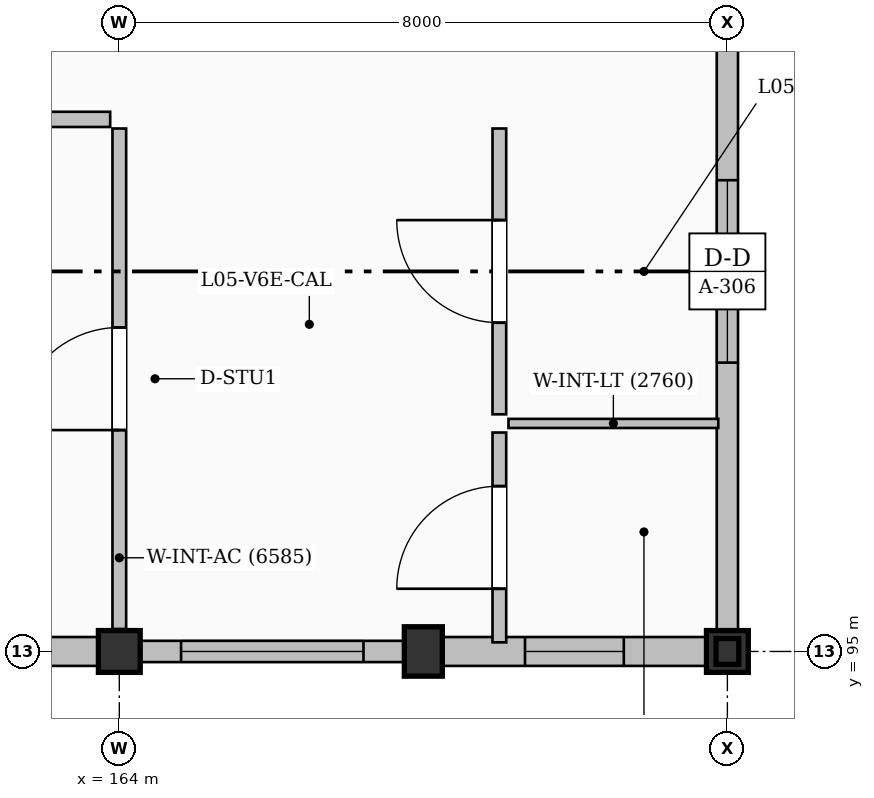
"""IFC4 building model, lengths in metres.
Left out: names, types, materials, properties, quantities, classifications, styles, units other than length and angle.
Written with IfcOpenShell. Run it as: python <this file> out.ifc"""

import sys

from ifc_helpers import new_model, si_unit, direction, frame, frame_2d, origin, origin_2d, place, context, subcontext, project, spatial, rectangle, i_section, extrude, element, fill, save


model = new_model("IFC4")
c1 = context("Model", 3, precision=1e-05, world=origin(), true_north=direction((0.0, 1.0)))
c2 = subcontext(c1, "Body", "Model", "MODEL_VIEW")
j1 = project(units=[si_unit("LENGTHUNIT", "METRE"), si_unit("PLANEANGLEUNIT", "RADIAN")], contexts=[c1])
p1 = place(None, origin())
s1 = spatial("IfcSite", under=j1, at=p1, CompositionType="ELEMENT")
p2 = place(p1, origin())
s2 = spatial("IfcBuilding", under=s1, at=p2, CompositionType="ELEMENT")
p3 = place(p2, frame((0.0, 0.0, 22.8)))
s3 = spatial("IfcBuildingStorey", under=s2, at=p3, CompositionType="ELEMENT", Elevation=22.8)
p4 = place(p3, frame((164.0, 95.0, 0.0), z_axis=(0.0, 0.0, 1.0), x_axis=(1.0, 0.0, 0.0)))
e1 = element("IfcColumn", 1, at=p4, inside=s3, PredefinedType="COLUMN", context=c2, shape_type="SweptSolid", body=[
    extrude(rectangle(XDim=0.55, YDim=0.55, at=origin_2d()), origin(), (0.0, 0.0, 1.0), 4.5),
])
p5 = place(p3, frame((168.0, 95.0, 0.0), z_axis=(0.0, 0.0, 1.0), x_axis=(1.0, 0.0, 0.0)))
e2 = element("IfcColumn", 2, at=p5, inside=s3, PredefinedType="PILASTER", context=c2, shape_type="SweptSolid", body=[
    extrude(rectangle(XDim=0.5, YDim=0.65, at=origin_2d()), origin(), (0.0, 0.0, 1.0), 4.5),
])
p6 = place(p3, frame((172.0, 95.0, 0.0), z_axis=(0.0, 0.0, 1.0), x_axis=(1.0, 0.0, 0.0)))
e3 = element("IfcColumn", 3, at=p6, inside=s3, PredefinedType="COLUMN", context=c2, shape_type="SweptSolid", body=[
    extrude(rectangle(XDim=0.55, YDim=0.55, at=origin_2d()), origin(), (0.0, 0.0, 1.0), 4.5),
])
p7 = place(p3, frame((172.0, 95.0, 4.5), z_axis=(0.0, 0.0, 1.0), x_axis=(1.0, 0.0, 0.0)))
e4 = element("IfcColumn", 4, at=p7, inside=s3, PredefinedType="COLUMN", context=c2, shape_type="SweptSolid", body=[
    extrude(i_section(OverallWidth=0.3, OverallDepth=0.34, WebThickness=0.012, FlangeThickness=0.021, FilletRadius=0.027, at=origin_2d()), origin(), (0.0, 0.0, 1.0), 1.342),
])
p8 = place(p3, frame((172.0, 104.725, 0.0), z_axis=(0.0, 0.0, 1.0), x_axis=(0.0, -1.0, 0.0)))
e5 = element("IfcWall", 5, at=p8, inside=s3, PredefinedType="SOLIDWALL", context=c2, shape_type="SweptSolid", body=[
    extrude(rectangle(XDim=9.45, YDim=0.28, at=frame_2d((4.725, 0.0))), origin(), (0.0, 0.0, 1.0), 3.585),
])
p9 = place(p8, frame((3.525, 0.0, 0.95)))
e6 = element("IfcOpeningElement", 6, at=p9, cuts=e5, PredefinedType="OPENING", context=c2, shape_type="SweptSolid", body=[
    extrude(rectangle(XDim=2.4, YDim=1.2, at=frame_2d((1.2, 0.6))), frame((0.0, 0.15, 0.0), z_axis=(0.0, -1.0, 0.0), x_axis=(1.0, 0.0, 0.0)), (0.0, 0.0, 1.0), 0.3),
])
p10 = place(p3, frame((171.725, 95.0, 0.0), z_axis=(0.0, 0.0, 1.0), x_axis=(-1.0, 0.0, 0.0)))
e7 = element("IfcWall", 7, at=p10, inside=s3, PredefinedType="SOLIDWALL", context=c2, shape_type="SweptSolid", body=[
    extrude(rectangle(XDim=3.475, YDim=0.38, at=frame_2d((1.738, 0.0))), origin(), (0.0, 0.0, 1.0), 4.125),
])
p11 = place(p10, frame((1.087, 0.0, 0.95)))
e8 = element("IfcOpeningElement", 8, at=p11, cuts=e7, PredefinedType="OPENING", context=c2, shape_type="SweptSolid", body=[
    extrude(rectangle(XDim=1.3, YDim=1.4, at=frame_2d((0.65, 0.7))), frame((0.0, 0.2, 0.0), z_axis=(0.0, -1.0, 0.0), x_axis=(1.0, 0.0, 0.0)), (0.0, 0.0, 1.0), 0.4),
])
p12 = place(p3, frame((167.75, 95.0, 0.0), z_axis=(0.0, 0.0, 1.0), x_axis=(-1.0, 0.0, 0.0)))
e9 = element("IfcWall", 9, at=p12, inside=s3, PredefinedType="SOLIDWALL", context=c2, shape_type="SweptSolid", body=[
    extrude(rectangle(XDim=3.475, YDim=0.28, at=frame_2d((1.738, 0.0))), origin(), (0.0, 0.0, 1.0), 4.125),
])
p13 = place(p12, frame((0.538, 0.0, 0.95)))
e10 = element("IfcOpeningElement", 10, at=p13, cuts=e9, PredefinedType="OPENING", context=c2, shape_type="SweptSolid", body=[
    extrude(rectangle(XDim=2.4, YDim=1.2, at=frame_2d((1.2, 0.6))), frame((0.0, 0.15, 0.0), z_axis=(0.0, -1.0, 0.0), x_axis=(1.0, 0.0, 0.0)), (0.0, 0.0, 1.0), 0.3),
])
p14 = place(p3, frame((163.725, 95.0, 0.0), z_axis=(0.0, 0.0, 1.0), x_axis=(-1.0, 0.0, 0.0)))
e11 = element("IfcWall", 11, at=p14, inside=s3, PredefinedType="SOLIDWALL", context=c2, shape_type="SweptSolid", body=[
    extrude(rectangle(XDim=3.525, YDim=0.38, at=frame_2d((1.763, 0.0))), origin(), (0.0, 0.0, 1.0), 4.125),
])
p15 = place(p14, frame((0.913, 0.0, 0.95)))
e12 = element("IfcOpeningElement", 12, at=p15, cuts=e11, PredefinedType="OPENING", context=c2, shape_type="SweptSolid", body=[
    extrude(rectangle(XDim=1.7, YDim=2.0, at=frame_2d((0.85, 1.0))), frame((0.0, 0.2, 0.0), z_axis=(0.0, -1.0, 0.0), x_axis=(1.0, 0.0, 0.0)), (0.0, 0.0, 1.0), 0.4),
])
p16 = place(p3, frame((164.0, 95.295, 0.0), z_axis=(0.0, 0.0, 1.0), x_axis=(0.0, 1.0, 0.0)))
e13 = element("IfcWall", 13, at=p16, inside=s3, PredefinedType="PARTITIONING", context=c2, shape_type="SweptSolid", body=[
    extrude(rectangle(XDim=6.585, YDim=0.18, at=frame_2d((3.292, 0.0))), origin(), (0.0, 0.0, 1.0), 4.25),
])
p17 = place(p16, frame((2.617, 0.0, 0.0)))
e14 = element("IfcOpeningElement", 14, at=p17, cuts=e13, PredefinedType="OPENING", context=c2, shape_type="SweptSolid", body=[
    extrude(rectangle(XDim=1.35, YDim=2.2, at=frame_2d((0.675, 1.1))), frame((0.0, 0.1, 0.0), z_axis=(0.0, -1.0, 0.0), x_axis=(1.0, 0.0, 0.0)), (0.0, 0.0, 1.0), 0.2),
])
p18 = place(p3, frame((154.12, 102.0, 0.0), z_axis=(0.0, 0.0, 1.0), x_axis=(1.0, 0.0, 0.0)))
e15 = element("IfcWall", 15, at=p18, inside=s3, PredefinedType="PARTITIONING", context=c2, shape_type="SweptSolid", body=[
    extrude(rectangle(XDim=9.76, YDim=0.2, at=frame_2d((4.88, 0.0))), origin(), (0.0, 0.0, 1.0), 4.25),
])
p19 = place(p18, frame((4.205, 0.0, 0.0)))
e16 = element("IfcOpeningElement", 16, at=p19, cuts=e15, PredefinedType="OPENING", context=c2, shape_type="SweptSolid", body=[
    extrude(rectangle(XDim=1.35, YDim=2.2, at=frame_2d((0.675, 1.1))), frame((0.0, 0.11, 0.0), z_axis=(0.0, -1.0, 0.0), x_axis=(1.0, 0.0, 0.0)), (0.0, 0.0, 1.0), 0.22),
])
p20 = place(p3, frame((169.0, 95.12, 0.0), z_axis=(0.0, 0.0, 1.0), x_axis=(0.0, 1.0, 0.0)))
e17 = element("IfcWall", 17, at=p20, inside=s3, PredefinedType="PARTITIONING", context=c2, shape_type="SweptSolid", body=[
    extrude(rectangle(XDim=2.76, YDim=0.18, at=frame_2d((1.38, 0.0))), origin(), (0.0, 0.0, 1.0), 4.25),
])
p21 = place(p20, frame((0.705, 0.0, 0.0)))
e18 = element("IfcOpeningElement", 18, at=p21, cuts=e17, PredefinedType="OPENING", context=c2, shape_type="SweptSolid", body=[
    extrude(rectangle(XDim=1.35, YDim=2.2, at=frame_2d((0.675, 1.1))), frame((0.0, 0.1, 0.0), z_axis=(0.0, -1.0, 0.0), x_axis=(1.0, 0.0, 0.0)), (0.0, 0.0, 1.0), 0.2),
])
p22 = place(p3, frame((169.0, 98.12, 0.0), z_axis=(0.0, 0.0, 1.0), x_axis=(0.0, 1.0, 0.0)))
e19 = element("IfcWall", 19, at=p22, inside=s3, PredefinedType="PARTITIONING", context=c2, shape_type="SweptSolid", body=[
    extrude(rectangle(XDim=3.76, YDim=0.18, at=frame_2d((1.88, 0.0))), origin(), (0.0, 0.0, 1.0), 4.25),
])
p23 = place(p22, frame((1.205, 0.0, 0.0)))
e20 = element("IfcOpeningElement", 20, at=p23, cuts=e19, PredefinedType="OPENING", context=c2, shape_type="SweptSolid", body=[
    extrude(rectangle(XDim=1.35, YDim=2.2, at=frame_2d((0.675, 1.1))), frame((0.0, 0.1, 0.0), z_axis=(0.0, -1.0, 0.0), x_axis=(1.0, 0.0, 0.0)), (0.0, 0.0, 1.0), 0.2),
])
p24 = place(p3, frame((169.12, 98.0, 0.0), z_axis=(0.0, 0.0, 1.0), x_axis=(1.0, 0.0, 0.0)))
e21 = element("IfcWall", 21, at=p24, inside=s3, PredefinedType="PARTITIONING", context=c2, shape_type="SweptSolid", body=[
    extrude(rectangle(XDim=2.76, YDim=0.12, at=frame_2d((1.38, 0.0))), origin(), (0.0, 0.0, 1.0), 4.25),
])
p25 = place(p9, origin())
e22 = element("IfcWindow", 22, at=p25, inside=s3, PartitioningType="TRIPLE_PANEL_HORIZONTAL", PredefinedType="WINDOW", context=c2, shape_type="SweptSolid", body=[
    extrude(rectangle(XDim=2.4, YDim=1.2, at=frame_2d((1.2, 0.6))), frame((0.0, 0.03, 0.0), z_axis=(0.0, -1.0, 0.0), x_axis=(1.0, 0.0, 0.0)), (0.0, 0.0, 1.0), 0.06),
])
fill(e6, e22)
p26 = place(p11, origin())
e23 = element("IfcWindow", 23, at=p26, inside=s3, PartitioningType="SINGLE_PANEL", PredefinedType="WINDOW", context=c2, shape_type="SweptSolid", body=[
    extrude(rectangle(XDim=1.3, YDim=1.4, at=frame_2d((0.65, 0.7))), frame((0.0, 0.03, 0.0), z_axis=(0.0, -1.0, 0.0), x_axis=(1.0, 0.0, 0.0)), (0.0, 0.0, 1.0), 0.06),
])
fill(e8, e23)
p27 = place(p13, origin())
e24 = element("IfcWindow", 24, at=p27, inside=s3, PartitioningType="TRIPLE_PANEL_HORIZONTAL", PredefinedType="WINDOW", context=c2, shape_type="SweptSolid", body=[
    extrude(rectangle(XDim=2.4, YDim=1.2, at=frame_2d((1.2, 0.6))), frame((0.0, 0.03, 0.0), z_axis=(0.0, -1.0, 0.0), x_axis=(1.0, 0.0, 0.0)), (0.0, 0.0, 1.0), 0.06),
])
fill(e10, e24)
p28 = place(p17, origin())
e25 = element("IfcDoor", 25, at=p28, inside=s3, OperationType="SINGLE_SWING_LEFT", PredefinedType="DOOR", context=c2, shape_type="SweptSolid", body=[
    extrude(rectangle(XDim=1.35, YDim=2.2, at=frame_2d((0.675, 1.1))), frame((0.0, 0.025, 0.0), z_axis=(0.0, -1.0, 0.0), x_axis=(1.0, 0.0, 0.0)), (0.0, 0.0, 1.0), 0.05),
])
fill(e14, e25)
p29 = place(p21, origin())
e26 = element("IfcDoor", 26, at=p29, inside=s3, OperationType="SINGLE_SWING_LEFT", PredefinedType="DOOR", context=c2, shape_type="SweptSolid", body=[
    extrude(rectangle(XDim=1.35, YDim=2.2, at=frame_2d((0.675, 1.1))), frame((0.0, 0.025, 0.0), z_axis=(0.0, -1.0, 0.0), x_axis=(1.0, 0.0, 0.0)), (0.0, 0.0, 1.0), 0.05),
])
fill(e18, e26)
p30 = place(p23, origin())
e27 = element("IfcDoor", 27, at=p30, inside=s3, OperationType="SINGLE_SWING_RIGHT", PredefinedType="DOOR", context=c2, shape_type="SweptSolid", body=[
    extrude(rectangle(XDim=1.35, YDim=2.2, at=frame_2d((0.675, 1.1))), frame((0.0, 0.025, 0.0), z_axis=(0.0, -1.0, 0.0), x_axis=(1.0, 0.0, 0.0)), (0.0, 0.0, 1.0), 0.05),
])
fill(e20, e27)
save(model, sys.argv[1])
